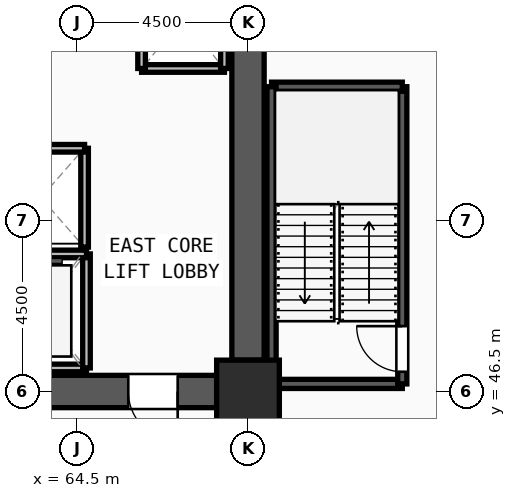
"""IFC4 building model, lengths in metres.
Left out: names, types, materials, properties, quantities, classifications, styles, units other than length and angle.
Written with IfcOpenShell. Run it as: python <this file> out.ifc"""

import sys

from ifc_helpers import new_model, si_unit, direction, frame, frame_2d, origin, origin_2d, place, context, subcontext, project, spatial, rectangle, extrude, source, transform, mapped, element, fill, save


model = new_model("IFC4")
c1 = context("Model", 3, precision=1e-05, world=origin(), true_north=direction((0.0, 1.0)))
c2 = subcontext(c1, "Body", "Model", "MODEL_VIEW")
j1 = project(units=[si_unit("LENGTHUNIT", "METRE"), si_unit("PLANEANGLEUNIT", "RADIAN")], contexts=[c1])
p1 = place(None, origin())
s1 = spatial("IfcSite", under=j1, at=p1, CompositionType="ELEMENT")
p2 = place(p1, origin())
s2 = spatial("IfcBuilding", under=s1, at=p2, CompositionType="ELEMENT")
p3 = place(p2, frame((0.0, 0.0, 85.5)))
s3 = spatial("IfcBuildingStorey", under=s2, at=p3, CompositionType="ELEMENT", Elevation=85.5)
m1 = source(origin(), c2, "Body", "SweptSolid", [
    extrude(rectangle(XDim=1.65, YDim=1.65, at=origin_2d()), origin(), (0.0, 0.0, 1.0), 3.75),
])
p4 = place(p3, frame((69.0, 46.5, 0.0), z_axis=(0.0, 0.0, 1.0), x_axis=(1.0, 0.0, 0.0)))
e1 = element("IfcColumn", 1, at=p4, inside=s3, PredefinedType="COLUMN", context=c2, shape_type="MappedRepresentation", body=[
    mapped(m1, transform((0.0, 0.0, 0.0), x_axis=(1.0, 0.0, 0.0), y_axis=(0.0, 1.0, 0.0), z_axis=(0.0, 0.0, 1.0), scale=1.0)),
])
p5 = place(p3, frame((69.0, 60.675, 0.0), z_axis=(0.0, 0.0, 1.0), x_axis=(0.0, -1.0, 0.0)))
e2 = element("IfcWall", 2, at=p5, inside=s3, PredefinedType="SHEAR", context=c2, shape_type="SweptSolid", body=[
    extrude(rectangle(XDim=13.35, YDim=0.85, at=frame_2d((6.675, 0.0))), origin(), (0.0, 0.0, 1.0), 3.57),
])
m2 = source(origin(), c2, "Body", "SweptSolid", [
    extrude(rectangle(XDim=1.2, YDim=2.2, at=frame_2d((0.6, 1.1))), frame((0.0, 0.435, 0.0), z_axis=(0.0, -1.0, 0.0), x_axis=(1.0, 0.0, 0.0)), (0.0, 0.0, 1.0), 0.87),
])
p6 = place(p5, frame((1.125, 0.0, 0.0)))
e3 = element("IfcOpeningElement", 3, at=p6, cuts=e2, PredefinedType="OPENING", context=c2, shape_type="MappedRepresentation", body=[
    mapped(m2, transform((0.0, 0.0, 0.0), x_axis=(1.0, 0.0, 0.0), y_axis=(0.0, 1.0, 0.0), z_axis=(0.0, 0.0, 1.0), scale=1.0)),
])
p7 = place(p3, frame((68.175, 46.5, 0.0), z_axis=(0.0, 0.0, 1.0), x_axis=(-1.0, 0.0, 0.0)))
e4 = element("IfcWall", 4, at=p7, inside=s3, PredefinedType="SHEAR", context=c2, shape_type="SweptSolid", body=[
    extrude(rectangle(XDim=7.35, YDim=0.85, at=frame_2d((3.675, 0.0))), origin(), (0.0, 0.0, 1.0), 3.57),
])
m3 = source(origin(), c2, "Body", "SweptSolid", [
    extrude(rectangle(XDim=1.3, YDim=2.2, at=frame_2d((0.65, 1.1))), frame((0.0, 0.435, 0.0), z_axis=(0.0, -1.0, 0.0), x_axis=(1.0, 0.0, 0.0)), (0.0, 0.0, 1.0), 0.87),
])
p8 = place(p7, frame((1.025, 0.0, 0.0)))
e5 = element("IfcOpeningElement", 5, at=p8, cuts=e4, PredefinedType="OPENING", context=c2, shape_type="MappedRepresentation", body=[
    mapped(m3, transform((0.0, 0.0, 0.0), x_axis=(1.0, 0.0, 0.0), y_axis=(0.0, 1.0, 0.0), z_axis=(0.0, 0.0, 1.0), scale=1.0)),
])
p9 = place(p3, frame((69.62, 46.7, 0.0), z_axis=(0.0, 0.0, 1.0), x_axis=(1.0, 0.0, 0.0)))
e6 = element("IfcWall", 6, at=p9, inside=s3, PredefinedType="SOLIDWALL", context=c2, shape_type="SweptSolid", body=[
    extrude(rectangle(XDim=3.44, YDim=0.24, at=frame_2d((1.72, 0.0))), origin(), (0.0, 0.0, 1.0), 3.57),
])
p10 = place(p3, frame((73.06, 46.7, 0.0), z_axis=(0.0, 0.0, 1.0), x_axis=(0.0, 1.0, 0.0)))
e7 = element("IfcWall", 7, at=p10, inside=s3, PredefinedType="SOLIDWALL", context=c2, shape_type="SweptSolid", body=[
    extrude(rectangle(XDim=7.82, YDim=0.24, at=frame_2d((3.91, 0.0))), origin(), (0.0, 0.0, 1.0), 3.57),
])
m4 = source(origin(), c2, "Body", "SweptSolid", [
    extrude(rectangle(XDim=1.2, YDim=2.2, at=frame_2d((0.6, 1.1))), frame((0.0, 0.13, 0.0), z_axis=(0.0, -1.0, 0.0), x_axis=(1.0, 0.0, 0.0)), (0.0, 0.0, 1.0), 0.26),
])
p11 = place(p10, frame((0.32, 0.0, 0.0)))
e8 = element("IfcOpeningElement", 8, at=p11, cuts=e7, PredefinedType="OPENING", context=c2, shape_type="MappedRepresentation", body=[
    mapped(m4, transform((0.0, 0.0, 0.0), x_axis=(1.0, 0.0, 0.0), y_axis=(0.0, 1.0, 0.0), z_axis=(0.0, 0.0, 1.0), scale=1.0)),
])
p12 = place(p3, frame((73.06, 54.52, 0.0), z_axis=(0.0, 0.0, 1.0), x_axis=(-1.0, 0.0, 0.0)))
e9 = element("IfcWall", 9, at=p12, inside=s3, PredefinedType="SOLIDWALL", context=c2, shape_type="SweptSolid", body=[
    extrude(rectangle(XDim=3.44, YDim=0.24, at=frame_2d((1.72, 0.0))), origin(), (0.0, 0.0, 1.0), 3.57),
])
p13 = place(p3, frame((69.62, 54.52, 0.0), z_axis=(0.0, 0.0, 1.0), x_axis=(0.0, -1.0, 0.0)))
e10 = element("IfcWall", 10, at=p13, inside=s3, PredefinedType="SOLIDWALL", context=c2, shape_type="SweptSolid", body=[
    extrude(rectangle(XDim=7.82, YDim=0.24, at=frame_2d((3.91, 0.0))), origin(), (0.0, 0.0, 1.0), 3.57),
])
p14 = place(p3, frame((62.35, 47.12, 0.0), z_axis=(0.0, 0.0, 1.0), x_axis=(1.0, 0.0, 0.0)))
e11 = element("IfcWall", 11, at=p14, inside=s3, PredefinedType="SOLIDWALL", context=c2, shape_type="SweptSolid", body=[
    extrude(rectangle(XDim=2.4, YDim=0.2, at=frame_2d((1.2, 0.0))), origin(), (0.0, 0.0, 1.0), 3.57),
])
p15 = place(p3, frame((64.75, 47.12, 0.0), z_axis=(0.0, 0.0, 1.0), x_axis=(0.0, 1.0, 0.0)))
e12 = element("IfcWall", 12, at=p15, inside=s3, PredefinedType="SOLIDWALL", context=c2, shape_type="SweptSolid", body=[
    extrude(rectangle(XDim=3.0, YDim=0.2, at=frame_2d((1.5, 0.0))), origin(), (0.0, 0.0, 1.0), 3.57),
])
p16 = place(p3, frame((64.75, 50.12, 0.0), z_axis=(0.0, 0.0, 1.0), x_axis=(-1.0, 0.0, 0.0)))
e13 = element("IfcWall", 13, at=p16, inside=s3, PredefinedType="SOLIDWALL", context=c2, shape_type="SweptSolid", body=[
    extrude(rectangle(XDim=2.4, YDim=0.2, at=frame_2d((1.2, 0.0))), origin(), (0.0, 0.0, 1.0), 3.57),
])
p17 = place(p3, frame((66.2, 55.0, 0.0), z_axis=(0.0, 0.0, 1.0), x_axis=(1.0, 0.0, 0.0)))
e14 = element("IfcWall", 14, at=p17, inside=s3, PredefinedType="SOLIDWALL", context=c2, shape_type="SweptSolid", body=[
    extrude(rectangle(XDim=2.18, YDim=0.2, at=frame_2d((1.09, 0.0))), origin(), (0.0, 0.0, 1.0), 3.57),
])
for number, where, z_axis, x_axis in (
    (15, (68.38, 55.0, 0.0), (0.0, 0.0, 1.0), (0.0, 1.0, 0.0)),
    (16, (66.2, 57.75, 0.0), (0.0, 0.0, 1.0), (0.0, -1.0, 0.0)),
):
    element("IfcWall", number, at=place(p3, frame(where, z_axis=z_axis, x_axis=x_axis)), inside=s3, PredefinedType="SOLIDWALL", context=c2, shape_type="SweptSolid", body=[
        extrude(rectangle(XDim=2.75, YDim=0.2, at=frame_2d((1.375, 0.0))), origin(), (0.0, 0.0, 1.0), 3.57),
    ])
p18 = place(p3, frame((64.7, 50.3, 0.0), z_axis=(0.0, 0.0, 1.0), x_axis=(0.0, 1.0, 0.0)))
e17 = element("IfcWall", 17, at=p18, inside=s3, PredefinedType="SOLIDWALL", context=c2, shape_type="SweptSolid", body=[
    extrude(rectangle(XDim=2.6, YDim=0.2, at=frame_2d((1.3, 0.0))), origin(), (0.0, 0.0, 1.0), 3.57),
])
p19 = place(p3, frame((64.7, 52.9, 0.0), z_axis=(0.0, 0.0, 1.0), x_axis=(-1.0, 0.0, 0.0)))
e18 = element("IfcWall", 18, at=p19, inside=s3, PredefinedType="SOLIDWALL", context=c2, shape_type="SweptSolid", body=[
    extrude(rectangle(XDim=2.3, YDim=0.2, at=frame_2d((1.15, 0.0))), origin(), (0.0, 0.0, 1.0), 3.57),
])
m5 = source(origin(), c2, "Body", "SweptSolid", [
    extrude(rectangle(XDim=1.3, YDim=2.2, at=frame_2d((0.65, 1.1))), frame((0.0, 0.025, 0.0), z_axis=(0.0, -1.0, 0.0), x_axis=(1.0, 0.0, 0.0)), (0.0, 0.0, 1.0), 0.05),
])
p20 = place(p8, origin())
e19 = element("IfcDoor", 19, at=p20, inside=s3, OperationType="SINGLE_SWING_LEFT", PredefinedType="DOOR", context=c2, shape_type="MappedRepresentation", body=[
    mapped(m5, transform((0.0, 0.0, 0.0), x_axis=(1.0, 0.0, 0.0), y_axis=(0.0, 1.0, 0.0), z_axis=(0.0, 0.0, 1.0), scale=1.0)),
])
fill(e5, e19)
m6 = source(origin(), c2, "Body", "SweptSolid", [
    extrude(rectangle(XDim=1.2, YDim=2.2, at=frame_2d((0.6, 1.1))), frame((0.0, 0.025, 0.0), z_axis=(0.0, -1.0, 0.0), x_axis=(1.0, 0.0, 0.0)), (0.0, 0.0, 1.0), 0.05),
])
p21 = place(p11, origin())
e20 = element("IfcDoor", 20, at=p21, inside=s3, OperationType="SINGLE_SWING_RIGHT", PredefinedType="DOOR", context=c2, shape_type="MappedRepresentation", body=[
    mapped(m6, transform((0.0, 0.0, 0.0), x_axis=(1.0, 0.0, 0.0), y_axis=(0.0, 1.0, 0.0), z_axis=(0.0, 0.0, 1.0), scale=1.0)),
])
fill(e8, e20)
save(model, sys.argv[1])
